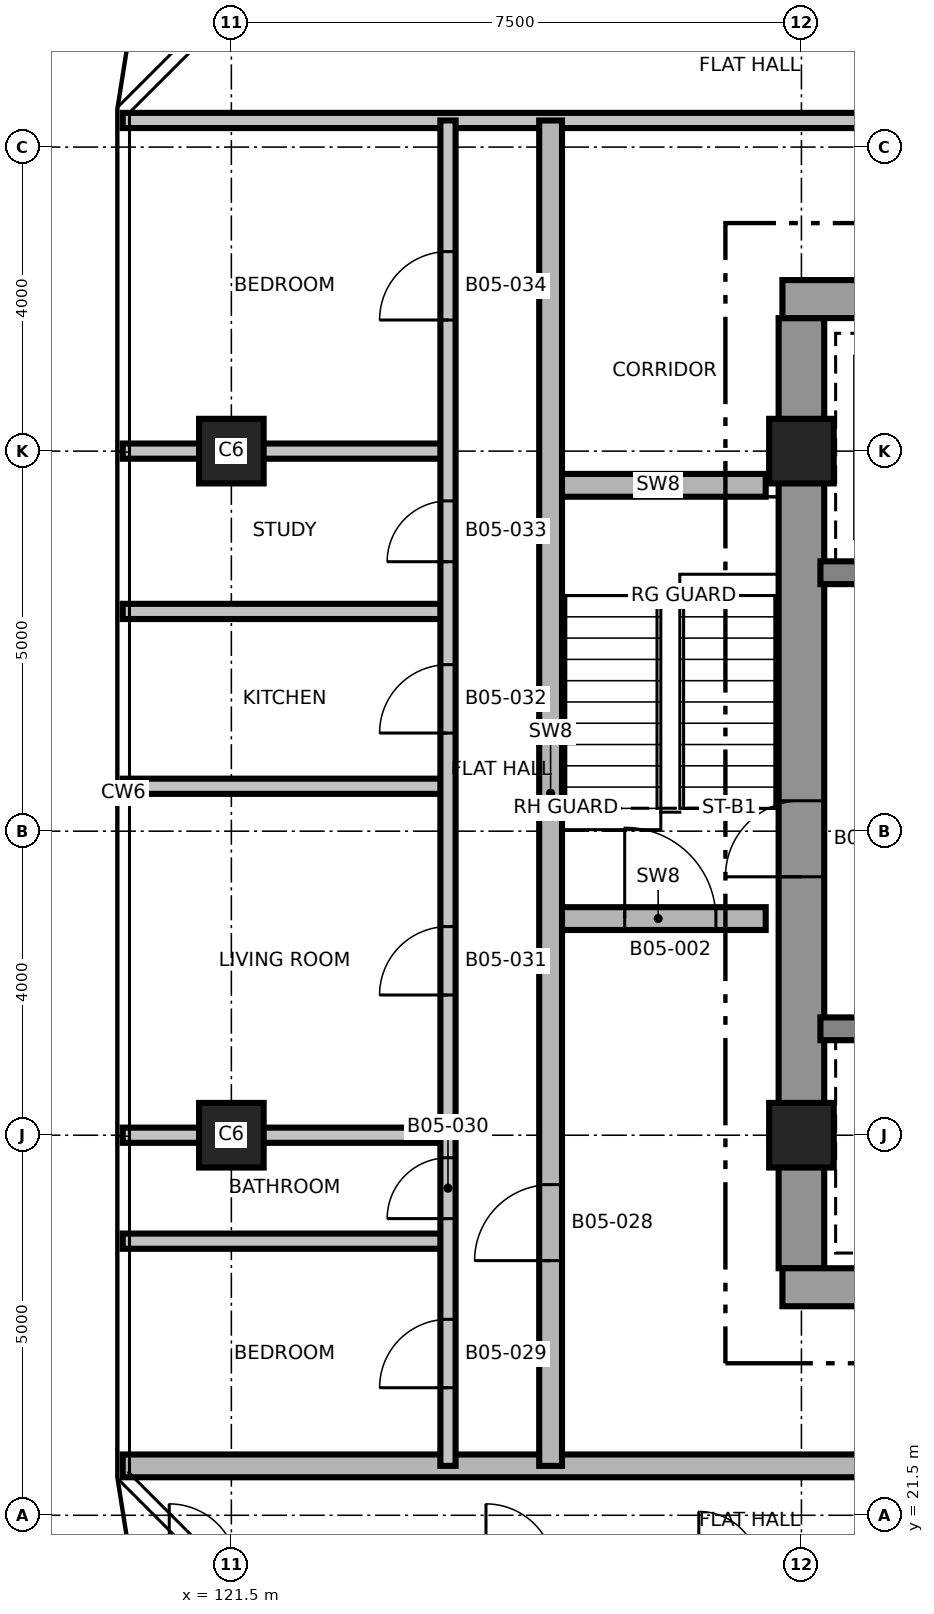
"""IFC4 building model, lengths in metres.
Left out: names, types, materials, properties, quantities, classifications, styles, units other than length and angle.
Written with IfcOpenShell. Run it as: python <this file> out.ifc"""

import sys

from ifc_helpers import new_model, si_unit, direction, frame, frame_2d, origin, origin_2d, place, context, subcontext, project, spatial, rectangle, extrude, element, fill, save


model = new_model("IFC4")
c1 = context("Model", 3, precision=1e-05, world=origin(), true_north=direction((0.0, 1.0)))
c2 = subcontext(c1, "Body", "Model", "MODEL_VIEW")
j1 = project(units=[si_unit("LENGTHUNIT", "METRE"), si_unit("PLANEANGLEUNIT", "RADIAN")], contexts=[c1])
p1 = place(None, origin())
s1 = spatial("IfcSite", under=j1, at=p1, CompositionType="ELEMENT")
p2 = place(p1, origin())
s2 = spatial("IfcBuilding", under=s1, at=p2, CompositionType="ELEMENT")
p3 = place(p2, frame((0.0, 0.0, 74.2)))
s3 = spatial("IfcBuildingStorey", under=s2, at=p3, CompositionType="ELEMENT", Elevation=74.2)
p4 = place(p3, frame((129.0, 24.75, 0.0), z_axis=(0.0, 0.0, 1.0), x_axis=(0.0, 1.0, 0.0)))
e1 = element("IfcWall", 1, at=p4, inside=s3, PredefinedType="SHEAR", context=c2, shape_type="SweptSolid", body=[
    extrude(rectangle(XDim=12.5, YDim=0.6, at=frame_2d((6.25, 0.0))), origin(), (0.0, 0.0, 1.0), 3.7),
])
p5 = place(p4, frame((5.15, 0.0, 0.0)))
e2 = element("IfcOpeningElement", 2, at=p5, cuts=e1, PredefinedType="OPENING", context=c2, shape_type="SweptSolid", body=[
    extrude(rectangle(XDim=1.0, YDim=2.1, at=frame_2d((0.5, 1.05))), frame((0.0, 0.31, 0.0), z_axis=(0.0, -1.0, 0.0), x_axis=(1.0, 0.0, 0.0)), (0.0, 0.0, 1.0), 0.62),
])
p6 = place(p3, frame((128.75, 24.5, 0.0), z_axis=(0.0, 0.0, 1.0), x_axis=(1.0, 0.0, 0.0)))
e3 = element("IfcWall", 3, at=p6, inside=s3, PredefinedType="SHEAR", context=c2, shape_type="SweptSolid", body=[
    extrude(rectangle(XDim=15.0, YDim=0.5, at=frame_2d((7.5, 0.0))), origin(), (0.0, 0.0, 1.0), 3.7),
])
p7 = place(p6, frame((9.65, 0.0, 0.0)))
e4 = element("IfcOpeningElement", 4, at=p7, cuts=e3, PredefinedType="OPENING", context=c2, shape_type="SweptSolid", body=[
    extrude(rectangle(XDim=1.5, YDim=2.1, at=frame_2d((0.75, 1.05))), frame((0.0, 0.26, 0.0), z_axis=(0.0, -1.0, 0.0), x_axis=(1.0, 0.0, 0.0)), (0.0, 0.0, 1.0), 0.52),
])
p8 = place(p6, frame((1.25, 0.0, 0.0)))
e5 = element("IfcOpeningElement", 5, at=p8, cuts=e3, PredefinedType="OPENING", context=c2, shape_type="SweptSolid", body=[
    extrude(rectangle(XDim=0.9, YDim=2.1, at=frame_2d((0.45, 1.05))), frame((0.0, 0.26, 0.0), z_axis=(0.0, -1.0, 0.0), x_axis=(1.0, 0.0, 0.0)), (0.0, 0.0, 1.0), 0.52),
])
p9 = place(p3, frame((128.75, 37.5, 0.0), z_axis=(0.0, 0.0, 1.0), x_axis=(1.0, 0.0, 0.0)))
e6 = element("IfcWall", 6, at=p9, inside=s3, PredefinedType="SHEAR", context=c2, shape_type="SweptSolid", body=[
    extrude(rectangle(XDim=15.0, YDim=0.5, at=frame_2d((7.5, 0.0))), origin(), (0.0, 0.0, 1.0), 3.7),
])
p10 = place(p9, frame((9.65, 0.0, 0.0)))
e7 = element("IfcOpeningElement", 7, at=p10, cuts=e6, PredefinedType="OPENING", context=c2, shape_type="SweptSolid", body=[
    extrude(rectangle(XDim=1.5, YDim=2.1, at=frame_2d((0.75, 1.05))), frame((0.0, 0.26, 0.0), z_axis=(0.0, -1.0, 0.0), x_axis=(1.0, 0.0, 0.0)), (0.0, 0.0, 1.0), 0.52),
])
p11 = place(p9, frame((12.85, 0.0, 0.0)))
e8 = element("IfcOpeningElement", 8, at=p11, cuts=e6, PredefinedType="OPENING", context=c2, shape_type="SweptSolid", body=[
    extrude(rectangle(XDim=0.9, YDim=2.1, at=frame_2d((0.45, 1.05))), frame((0.0, 0.26, 0.0), z_axis=(0.0, -1.0, 0.0), x_axis=(1.0, 0.0, 0.0)), (0.0, 0.0, 1.0), 0.52),
])
p12 = place(p9, frame((4.1, 0.0, 0.0)))
e9 = element("IfcOpeningElement", 9, at=p12, cuts=e6, PredefinedType="OPENING", context=c2, shape_type="SweptSolid", body=[
    extrude(rectangle(XDim=0.9, YDim=2.1, at=frame_2d((0.45, 1.05))), frame((0.0, 0.26, 0.0), z_axis=(0.0, -1.0, 0.0), x_axis=(1.0, 0.0, 0.0)), (0.0, 0.0, 1.0), 0.52),
])
p13 = place(p9, frame((7.0, 0.0, 0.0)))
e10 = element("IfcOpeningElement", 10, at=p13, cuts=e6, PredefinedType="OPENING", context=c2, shape_type="SweptSolid", body=[
    extrude(rectangle(XDim=0.9, YDim=2.1, at=frame_2d((0.45, 1.05))), frame((0.0, 0.26, 0.0), z_axis=(0.0, -1.0, 0.0), x_axis=(1.0, 0.0, 0.0)), (0.0, 0.0, 1.0), 0.52),
])
p14 = place(p3, frame((129.25, 27.9, 0.0), z_axis=(0.0, 0.0, 1.0), x_axis=(1.0, 0.0, 0.0)))
e11 = element("IfcWall", 11, at=p14, inside=s3, PredefinedType="SHEAR", context=c2, shape_type="SweptSolid", body=[
    extrude(rectangle(XDim=2.7, YDim=0.3, at=frame_2d((1.35, 0.0))), origin(), (0.0, 0.0, 1.0), 3.7),
])
p15 = place(p3, frame((129.25, 33.9, 0.0), z_axis=(0.0, 0.0, 1.0), x_axis=(1.0, 0.0, 0.0)))
e12 = element("IfcWall", 12, at=p15, inside=s3, PredefinedType="SHEAR", context=c2, shape_type="SweptSolid", body=[
    extrude(rectangle(XDim=2.7, YDim=0.3, at=frame_2d((1.35, 0.0))), origin(), (0.0, 0.0, 1.0), 3.7),
])
p16 = place(p15, frame((1.05, 0.0, 0.0)))
e13 = element("IfcOpeningElement", 13, at=p16, cuts=e12, PredefinedType="OPENING", context=c2, shape_type="SweptSolid", body=[
    extrude(rectangle(XDim=1.3, YDim=2.4, at=frame_2d((0.65, 1.2))), frame((0.0, 0.16, 0.0), z_axis=(0.0, -1.0, 0.0), x_axis=(1.0, 0.0, 0.0)), (0.0, 0.0, 1.0), 0.32),
])
for number, where, z_axis, x_axis in (
    (14, (121.5, 26.5, 0.0), (0.0, 0.0, 1.0), (1.0, 0.0, 0.0)),
    (15, (129.0, 26.5, 0.0), (0.0, 0.0, 1.0), (1.0, 0.0, 0.0)),
    (16, (121.5, 35.5, 0.0), (0.0, 0.0, 1.0), (1.0, 0.0, 0.0)),
    (17, (129.0, 35.5, 0.0), (0.0, 0.0, 1.0), (1.0, 0.0, 0.0)),
):
    element("IfcColumn", number, at=place(p3, frame(where, z_axis=z_axis, x_axis=x_axis)), inside=s3, PredefinedType="COLUMN", context=c2, shape_type="SweptSolid", body=[
        extrude(rectangle(XDim=0.85, YDim=0.85, at=origin_2d()), origin(), (0.0, 0.0, 1.0), 3.7),
    ])
p17 = place(p3, frame((120.07, 22.15, 0.0), z_axis=(0.0, 0.0, 1.0), x_axis=(1.0, 0.0, 0.0)))
e18 = element("IfcWall", 18, at=p17, inside=s3, PredefinedType="SHEAR", context=c2, shape_type="SweptSolid", body=[
    extrude(rectangle(XDim=32.86, YDim=0.3, at=frame_2d((16.43, 0.0))), origin(), (0.0, 0.0, 1.0), 3.4),
])
p18 = place(p17, frame((22.68, 0.0, 0.0)))
e19 = element("IfcOpeningElement", 19, at=p18, cuts=e18, PredefinedType="OPENING", context=c2, shape_type="SweptSolid", body=[
    extrude(rectangle(XDim=1.0, YDim=2.1, at=frame_2d((0.5, 1.05))), frame((0.0, 0.16, 0.0), z_axis=(0.0, -1.0, 0.0), x_axis=(1.0, 0.0, 0.0)), (0.0, 0.0, 1.0), 0.32),
])
p19 = place(p17, frame((11.03, 0.0, 0.0)))
e20 = element("IfcOpeningElement", 20, at=p19, cuts=e18, PredefinedType="OPENING", context=c2, shape_type="SweptSolid", body=[
    extrude(rectangle(XDim=1.0, YDim=2.1, at=frame_2d((0.5, 1.05))), frame((0.0, 0.16, 0.0), z_axis=(0.0, -1.0, 0.0), x_axis=(1.0, 0.0, 0.0)), (0.0, 0.0, 1.0), 0.32),
])
p20 = place(p17, frame((24.58, 0.0, 0.0)))
e21 = element("IfcOpeningElement", 21, at=p20, cuts=e18, PredefinedType="OPENING", context=c2, shape_type="SweptSolid", body=[
    extrude(rectangle(XDim=1.0, YDim=2.1, at=frame_2d((0.5, 1.05))), frame((0.0, 0.16, 0.0), z_axis=(0.0, -1.0, 0.0), x_axis=(1.0, 0.0, 0.0)), (0.0, 0.0, 1.0), 0.32),
])
p21 = place(p17, frame((16.68, 0.0, 0.0)))
e22 = element("IfcOpeningElement", 22, at=p21, cuts=e18, PredefinedType="OPENING", context=c2, shape_type="SweptSolid", body=[
    extrude(rectangle(XDim=0.9, YDim=2.1, at=frame_2d((0.45, 1.05))), frame((0.0, 0.16, 0.0), z_axis=(0.0, -1.0, 0.0), x_axis=(1.0, 0.0, 0.0)), (0.0, 0.0, 1.0), 0.32),
])
for number, where, z_axis, x_axis in (
    (23, (120.07, 25.106, 0.0), (0.0, 0.0, 1.0), (1.0, 0.0, 0.0)),
    (24, (120.07, 26.5, 0.0), (0.0, 0.0, 1.0), (1.0, 0.0, 0.0)),
):
    element("IfcWall", number, at=place(p3, frame(where, z_axis=z_axis, x_axis=x_axis)), inside=s3, PredefinedType="PARTITIONING", context=c2, shape_type="SweptSolid", body=[
        extrude(rectangle(XDim=4.28, YDim=0.2, at=frame_2d((2.14, 0.0))), origin(), (0.0, 0.0, 1.0), 3.4),
    ])
p22 = place(p3, frame((125.7, 29.35, 0.0), z_axis=(0.0, 0.0, 1.0), x_axis=(1.0, 0.0, 0.0)))
e25 = element("IfcWall", 25, at=p22, inside=s3, PredefinedType="SHEAR", context=c2, shape_type="SweptSolid", body=[
    extrude(rectangle(XDim=2.83, YDim=0.3, at=frame_2d((1.415, 0.0))), origin(), (0.0, 0.0, 1.0), 3.4),
])
p23 = place(p22, frame((0.975, 0.0, 0.0)))
e26 = element("IfcOpeningElement", 26, at=p23, cuts=e25, PredefinedType="OPENING", context=c2, shape_type="SweptSolid", body=[
    extrude(rectangle(XDim=1.2, YDim=2.1, at=frame_2d((0.6, 1.05))), frame((0.0, 0.16, 0.0), z_axis=(0.0, -1.0, 0.0), x_axis=(1.0, 0.0, 0.0)), (0.0, 0.0, 1.0), 0.32),
])
for number, where, z_axis, x_axis in (
    (27, (120.07, 31.091, 0.0), (0.0, 0.0, 1.0), (1.0, 0.0, 0.0)),
    (28, (120.07, 33.391, 0.0), (0.0, 0.0, 1.0), (1.0, 0.0, 0.0)),
):
    element("IfcWall", number, at=place(p3, frame(where, z_axis=z_axis, x_axis=x_axis)), inside=s3, PredefinedType="PARTITIONING", context=c2, shape_type="SweptSolid", body=[
        extrude(rectangle(XDim=4.28, YDim=0.2, at=frame_2d((2.14, 0.0))), origin(), (0.0, 0.0, 1.0), 3.4),
    ])
p24 = place(p3, frame((125.7, 35.05, 0.0), z_axis=(0.0, 0.0, 1.0), x_axis=(1.0, 0.0, 0.0)))
e29 = element("IfcWall", 29, at=p24, inside=s3, PredefinedType="SHEAR", context=c2, shape_type="SweptSolid", body=[
    extrude(rectangle(XDim=2.83, YDim=0.3, at=frame_2d((1.415, 0.0))), origin(), (0.0, 0.0, 1.0), 3.4),
])
p25 = place(p3, frame((120.07, 35.5, 0.0), z_axis=(0.0, 0.0, 1.0), x_axis=(1.0, 0.0, 0.0)))
e30 = element("IfcWall", 30, at=p25, inside=s3, PredefinedType="PARTITIONING", context=c2, shape_type="SweptSolid", body=[
    extrude(rectangle(XDim=4.28, YDim=0.2, at=frame_2d((2.14, 0.0))), origin(), (0.0, 0.0, 1.0), 3.4),
])
p26 = place(p3, frame((120.07, 39.85, 0.0), z_axis=(0.0, 0.0, 1.0), x_axis=(1.0, 0.0, 0.0)))
e31 = element("IfcWall", 31, at=p26, inside=s3, PredefinedType="PARTITIONING", context=c2, shape_type="SweptSolid", body=[
    extrude(rectangle(XDim=32.86, YDim=0.2, at=frame_2d((16.43, 0.0))), origin(), (0.0, 0.0, 1.0), 3.4),
])
p27 = place(p26, frame((11.03, 0.0, 0.0)))
e32 = element("IfcOpeningElement", 32, at=p27, cuts=e31, PredefinedType="OPENING", context=c2, shape_type="SweptSolid", body=[
    extrude(rectangle(XDim=1.0, YDim=2.1, at=frame_2d((0.5, 1.05))), frame((0.0, 0.11, 0.0), z_axis=(0.0, -1.0, 0.0), x_axis=(1.0, 0.0, 0.0)), (0.0, 0.0, 1.0), 0.22),
])
p28 = place(p26, frame((20.83, 0.0, 0.0)))
e33 = element("IfcOpeningElement", 33, at=p28, cuts=e31, PredefinedType="OPENING", context=c2, shape_type="SweptSolid", body=[
    extrude(rectangle(XDim=1.0, YDim=2.1, at=frame_2d((0.5, 1.05))), frame((0.0, 0.11, 0.0), z_axis=(0.0, -1.0, 0.0), x_axis=(1.0, 0.0, 0.0)), (0.0, 0.0, 1.0), 0.22),
])
p29 = place(p3, frame((124.35, 22.15, 0.0), z_axis=(0.0, 0.0, 1.0), x_axis=(0.0, 1.0, 0.0)))
e34 = element("IfcWall", 34, at=p29, inside=s3, PredefinedType="PARTITIONING", context=c2, shape_type="SweptSolid", body=[
    extrude(rectangle(XDim=17.7, YDim=0.2, at=frame_2d((8.85, 0.0))), origin(), (0.0, 0.0, 1.0), 3.4),
])
p30 = place(p29, frame((1.028, 0.0, 0.0)))
e35 = element("IfcOpeningElement", 35, at=p30, cuts=e34, PredefinedType="OPENING", context=c2, shape_type="SweptSolid", body=[
    extrude(rectangle(XDim=0.9, YDim=2.1, at=frame_2d((0.45, 1.05))), frame((0.0, 0.11, 0.0), z_axis=(0.0, -1.0, 0.0), x_axis=(1.0, 0.0, 0.0)), (0.0, 0.0, 1.0), 0.22),
])
p31 = place(p29, frame((3.253, 0.0, 0.0)))
e36 = element("IfcOpeningElement", 36, at=p31, cuts=e34, PredefinedType="OPENING", context=c2, shape_type="SweptSolid", body=[
    extrude(rectangle(XDim=0.8, YDim=2.1, at=frame_2d((0.4, 1.05))), frame((0.0, 0.11, 0.0), z_axis=(0.0, -1.0, 0.0), x_axis=(1.0, 0.0, 0.0)), (0.0, 0.0, 1.0), 0.22),
])
p32 = place(p29, frame((6.195, 0.0, 0.0)))
e37 = element("IfcOpeningElement", 37, at=p32, cuts=e34, PredefinedType="OPENING", context=c2, shape_type="SweptSolid", body=[
    extrude(rectangle(XDim=0.9, YDim=2.1, at=frame_2d((0.45, 1.05))), frame((0.0, 0.11, 0.0), z_axis=(0.0, -1.0, 0.0), x_axis=(1.0, 0.0, 0.0)), (0.0, 0.0, 1.0), 0.22),
])
p33 = place(p29, frame((9.641, 0.0, 0.0)))
e38 = element("IfcOpeningElement", 38, at=p33, cuts=e34, PredefinedType="OPENING", context=c2, shape_type="SweptSolid", body=[
    extrude(rectangle(XDim=0.9, YDim=2.1, at=frame_2d((0.45, 1.05))), frame((0.0, 0.11, 0.0), z_axis=(0.0, -1.0, 0.0), x_axis=(1.0, 0.0, 0.0)), (0.0, 0.0, 1.0), 0.22),
])
p34 = place(p29, frame((11.895, 0.0, 0.0)))
e39 = element("IfcOpeningElement", 39, at=p34, cuts=e34, PredefinedType="OPENING", context=c2, shape_type="SweptSolid", body=[
    extrude(rectangle(XDim=0.8, YDim=2.1, at=frame_2d((0.4, 1.05))), frame((0.0, 0.11, 0.0), z_axis=(0.0, -1.0, 0.0), x_axis=(1.0, 0.0, 0.0)), (0.0, 0.0, 1.0), 0.22),
])
p35 = place(p29, frame((15.075, 0.0, 0.0)))
e40 = element("IfcOpeningElement", 40, at=p35, cuts=e34, PredefinedType="OPENING", context=c2, shape_type="SweptSolid", body=[
    extrude(rectangle(XDim=0.9, YDim=2.1, at=frame_2d((0.45, 1.05))), frame((0.0, 0.11, 0.0), z_axis=(0.0, -1.0, 0.0), x_axis=(1.0, 0.0, 0.0)), (0.0, 0.0, 1.0), 0.22),
])
p36 = place(p3, frame((125.7, 22.15, 0.0), z_axis=(0.0, 0.0, 1.0), x_axis=(0.0, 1.0, 0.0)))
e41 = element("IfcWall", 41, at=p36, inside=s3, PredefinedType="SHEAR", context=c2, shape_type="SweptSolid", body=[
    extrude(rectangle(XDim=17.7, YDim=0.3, at=frame_2d((8.85, 0.0))), origin(), (0.0, 0.0, 1.0), 3.4),
])
p37 = place(p36, frame((2.7, 0.0, 0.0)))
e42 = element("IfcOpeningElement", 42, at=p37, cuts=e41, PredefinedType="OPENING", context=c2, shape_type="SweptSolid", body=[
    extrude(rectangle(XDim=1.0, YDim=2.1, at=frame_2d((0.5, 1.05))), frame((0.0, 0.16, 0.0), z_axis=(0.0, -1.0, 0.0), x_axis=(1.0, 0.0, 0.0)), (0.0, 0.0, 1.0), 0.32),
])
p38 = place(p23, origin())
e43 = element("IfcDoor", 43, at=p38, inside=s3, OperationType="SINGLE_SWING_RIGHT", PredefinedType="DOOR", context=c2, shape_type="SweptSolid", body=[
    extrude(rectangle(XDim=1.2, YDim=2.1, at=frame_2d((0.6, 1.05))), frame((0.0, 0.025, 0.0), z_axis=(0.0, -1.0, 0.0), x_axis=(1.0, 0.0, 0.0)), (0.0, 0.0, 1.0), 0.05),
])
fill(e26, e43)
p39 = place(p37, origin())
e44 = element("IfcDoor", 44, at=p39, inside=s3, OperationType="SINGLE_SWING_RIGHT", PredefinedType="DOOR", context=c2, shape_type="SweptSolid", body=[
    extrude(rectangle(XDim=1.0, YDim=2.1, at=frame_2d((0.5, 1.05))), frame((0.0, 0.025, 0.0), z_axis=(0.0, -1.0, 0.0), x_axis=(1.0, 0.0, 0.0)), (0.0, 0.0, 1.0), 0.05),
])
fill(e42, e44)
p40 = place(p30, origin())
e45 = element("IfcDoor", 45, at=p40, inside=s3, OperationType="SINGLE_SWING_LEFT", PredefinedType="DOOR", context=c2, shape_type="SweptSolid", body=[
    extrude(rectangle(XDim=0.9, YDim=2.1, at=frame_2d((0.45, 1.05))), frame((0.0, 0.025, 0.0), z_axis=(0.0, -1.0, 0.0), x_axis=(1.0, 0.0, 0.0)), (0.0, 0.0, 1.0), 0.05),
])
fill(e35, e45)
p41 = place(p31, origin())
e46 = element("IfcDoor", 46, at=p41, inside=s3, OperationType="SINGLE_SWING_RIGHT", PredefinedType="DOOR", context=c2, shape_type="SweptSolid", body=[
    extrude(rectangle(XDim=0.8, YDim=2.1, at=frame_2d((0.4, 1.05))), frame((0.0, 0.025, 0.0), z_axis=(0.0, -1.0, 0.0), x_axis=(1.0, 0.0, 0.0)), (0.0, 0.0, 1.0), 0.05),
])
fill(e36, e46)
p42 = place(p32, origin())
e47 = element("IfcDoor", 47, at=p42, inside=s3, OperationType="SINGLE_SWING_LEFT", PredefinedType="DOOR", context=c2, shape_type="SweptSolid", body=[
    extrude(rectangle(XDim=0.9, YDim=2.1, at=frame_2d((0.45, 1.05))), frame((0.0, 0.025, 0.0), z_axis=(0.0, -1.0, 0.0), x_axis=(1.0, 0.0, 0.0)), (0.0, 0.0, 1.0), 0.05),
])
fill(e37, e47)
p43 = place(p33, origin())
e48 = element("IfcDoor", 48, at=p43, inside=s3, OperationType="SINGLE_SWING_RIGHT", PredefinedType="DOOR", context=c2, shape_type="SweptSolid", body=[
    extrude(rectangle(XDim=0.9, YDim=2.1, at=frame_2d((0.45, 1.05))), frame((0.0, 0.025, 0.0), z_axis=(0.0, -1.0, 0.0), x_axis=(1.0, 0.0, 0.0)), (0.0, 0.0, 1.0), 0.05),
])
fill(e38, e48)
p44 = place(p34, origin())
e49 = element("IfcDoor", 49, at=p44, inside=s3, OperationType="SINGLE_SWING_LEFT", PredefinedType="DOOR", context=c2, shape_type="SweptSolid", body=[
    extrude(rectangle(XDim=0.8, YDim=2.1, at=frame_2d((0.4, 1.05))), frame((0.0, 0.025, 0.0), z_axis=(0.0, -1.0, 0.0), x_axis=(1.0, 0.0, 0.0)), (0.0, 0.0, 1.0), 0.05),
])
fill(e39, e49)
p45 = place(p35, origin())
e50 = element("IfcDoor", 50, at=p45, inside=s3, OperationType="SINGLE_SWING_RIGHT", PredefinedType="DOOR", context=c2, shape_type="SweptSolid", body=[
    extrude(rectangle(XDim=0.9, YDim=2.1, at=frame_2d((0.45, 1.05))), frame((0.0, 0.025, 0.0), z_axis=(0.0, -1.0, 0.0), x_axis=(1.0, 0.0, 0.0)), (0.0, 0.0, 1.0), 0.05),
])
fill(e40, e50)
p46 = place(p5, origin())
e51 = element("IfcDoor", 51, at=p46, inside=s3, OperationType="SINGLE_SWING_RIGHT", PredefinedType="DOOR", context=c2, shape_type="SweptSolid", body=[
    extrude(rectangle(XDim=1.0, YDim=2.1, at=frame_2d((0.5, 1.05))), frame((0.0, 0.025, 0.0), z_axis=(0.0, -1.0, 0.0), x_axis=(1.0, 0.0, 0.0)), (0.0, 0.0, 1.0), 0.05),
])
fill(e2, e51)
save(model, sys.argv[1])
